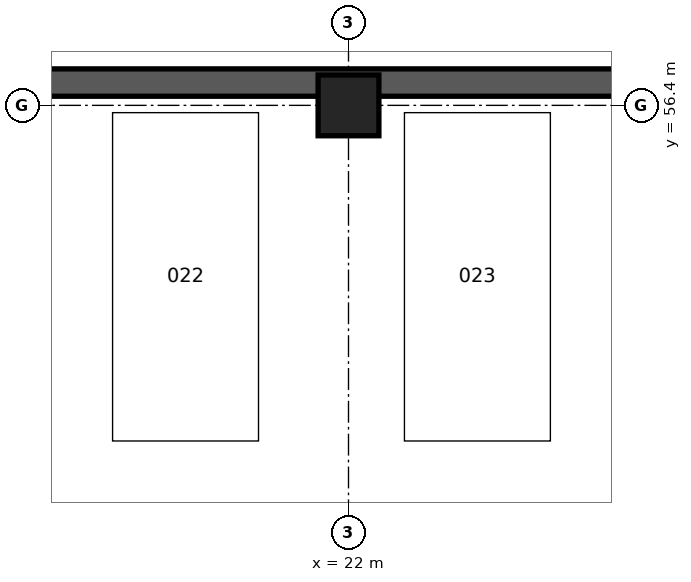
"""IFC4 building model, lengths in metres.
Left out: names, types, materials, properties, quantities, classifications, styles, units other than length and angle.
Written with IfcOpenShell. Run it as: python <this file> out.ifc"""

import sys

from ifc_helpers import new_model, si_unit, direction, frame, frame_2d, origin, origin_2d, place, context, subcontext, project, spatial, rectangle, extrude, element, save


model = new_model("IFC4")
c1 = context("Model", 3, precision=1e-05, world=origin(), true_north=direction((0.0, 1.0)))
c2 = subcontext(c1, "Body", "Model", "MODEL_VIEW")
j1 = project(units=[si_unit("LENGTHUNIT", "METRE"), si_unit("PLANEANGLEUNIT", "RADIAN")], contexts=[c1])
p1 = place(None, origin())
s1 = spatial("IfcSite", under=j1, at=p1, CompositionType="ELEMENT")
p2 = place(p1, origin())
s2 = spatial("IfcBuilding", under=s1, at=p2, CompositionType="ELEMENT")
p3 = place(p2, frame((0.0, 0.0, -7.4)))
s3 = spatial("IfcBuildingStorey", under=s2, at=p3, CompositionType="ELEMENT", Elevation=-7.4)
p4 = place(p3, frame((22.0, 56.4, -0.4), z_axis=(0.0, 0.0, 1.0), x_axis=(1.0, 0.0, 0.0)))
e1 = element("IfcColumn", 1, at=p4, inside=s3, PredefinedType="COLUMN", context=c2, shape_type="SweptSolid", body=[
    extrude(rectangle(XDim=1.0, YDim=1.0, at=origin_2d()), origin(), (0.0, 0.0, 1.0), 4.1),
])
p5 = place(p3, frame((78.0, 56.775, -0.4), z_axis=(0.0, 0.0, 1.0), x_axis=(-1.0, 0.0, 0.0)))
e2 = element("IfcWall", 2, at=p5, inside=s3, PredefinedType="SHEAR", context=c2, shape_type="SweptSolid", body=[
    extrude(rectangle(XDim=76.0, YDim=0.45, at=frame_2d((38.0, 0.0))), origin(), (0.0, 0.0, 1.0), 4.1),
])
save(model, sys.argv[1])
